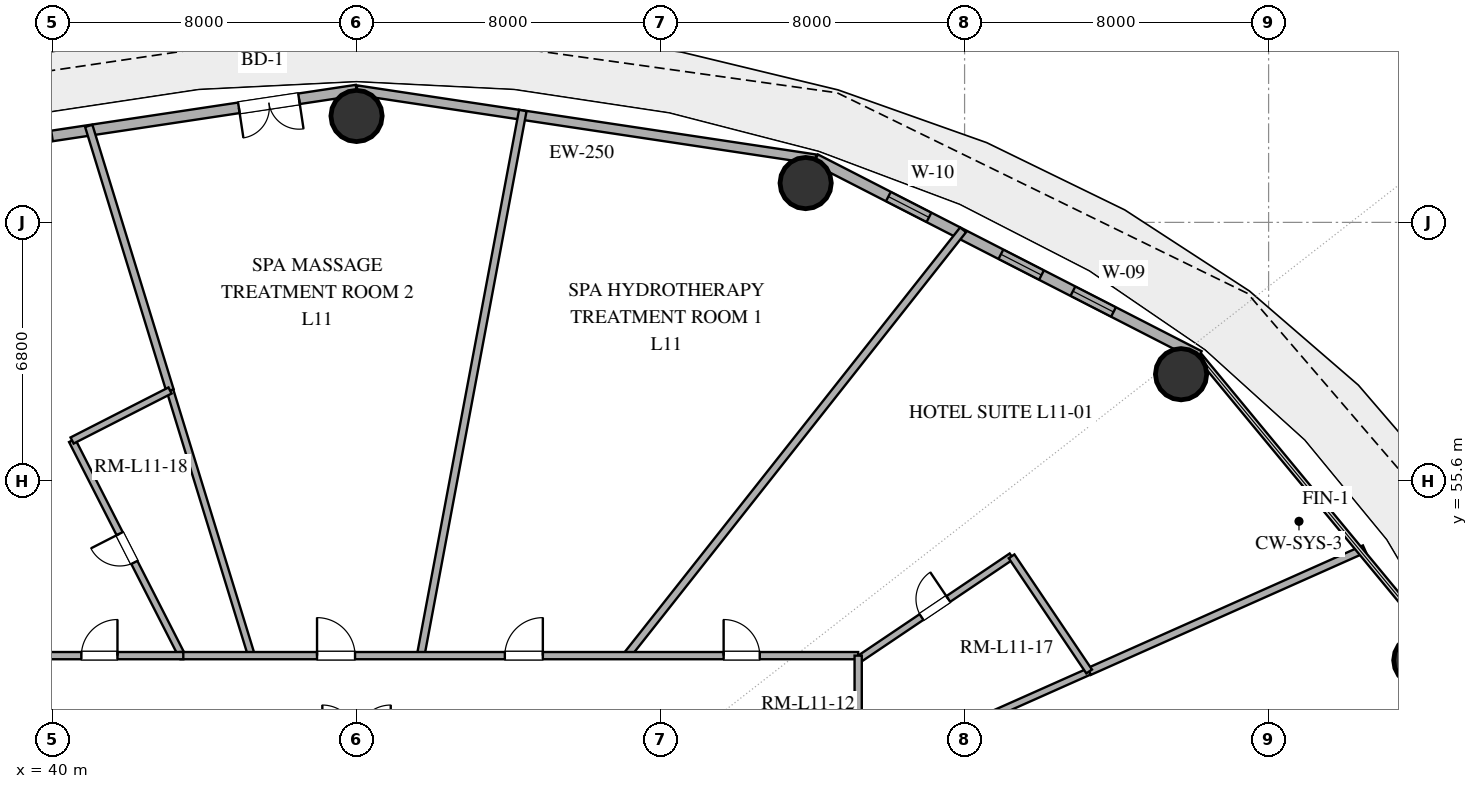
"""IFC4 building model, lengths in metres.
Left out: names, types, materials, properties, quantities, classifications, styles, units other than length and angle.
Written with IfcOpenShell. Run it as: python <this file> out.ifc"""

import sys

from ifc_helpers import new_model, si_unit, direction, frame, frame_2d, origin, origin_2d, place, context, subcontext, project, spatial, rectangle, hollow_circle, extrude, element, fill, save


model = new_model("IFC4")
c1 = context("Model", 3, precision=1e-05, world=origin(), true_north=direction((0.0, 1.0)))
c2 = subcontext(c1, "Body", "Model", "MODEL_VIEW")
j1 = project(units=[si_unit("LENGTHUNIT", "METRE"), si_unit("PLANEANGLEUNIT", "RADIAN")], contexts=[c1])
p1 = place(None, origin())
s1 = spatial("IfcSite", under=j1, at=p1, CompositionType="ELEMENT")
p2 = place(p1, origin())
s2 = spatial("IfcBuilding", under=s1, at=p2, CompositionType="ELEMENT")
p3 = place(p2, frame((0.0, 0.0, 49.8)))
s3 = spatial("IfcBuildingStorey", under=s2, at=p3, CompositionType="ELEMENT", Elevation=49.8)
for number, where, z_axis, x_axis in (
    (1, (75.966, 50.878, 0.0), (0.0, 0.0, 1.0), (1.0, 0.0, 0.0)),
    (2, (69.697, 58.405, 0.0), (0.0, 0.0, 1.0), (1.0, 0.0, 0.0)),
    (3, (59.818, 63.434, 0.0), (0.0, 0.0, 1.0), (1.0, 0.0, 0.0)),
    (4, (48.0, 65.2, 0.0), (0.0, 0.0, 1.0), (1.0, 0.0, 0.0)),
):
    element("IfcColumn", number, at=place(p3, frame(where, z_axis=z_axis, x_axis=x_axis)), inside=s3, PredefinedType="COLUMN", context=c2, shape_type="SweptSolid", body=[
        extrude(hollow_circle(Radius=0.675, WallThickness=0.036, at=origin_2d()), origin(), (0.0, 0.0, 1.0), 3.38),
    ])
p4 = place(p3, frame((70.174, 58.886, 0.0), z_axis=(0.0, 0.0, 1.0), x_axis=(-0.889853976658, 0.456245438581, 0.0)))
e5 = element("IfcWall", 5, at=p4, inside=s3, PredefinedType="SOLIDWALL", context=c2, shape_type="SweptSolid", body=[
    extrude(rectangle(XDim=11.346, YDim=0.28, at=frame_2d((5.673, 0.0))), origin(), (0.0, 0.0, 1.0), 3.38),
])
p5 = place(p4, frame((2.535, 0.0, 0.85)))
e6 = element("IfcOpeningElement", 6, at=p5, cuts=e5, PredefinedType="OPENING", context=c2, shape_type="SweptSolid", body=[
    extrude(rectangle(XDim=1.2, YDim=1.8, at=frame_2d((0.6, 0.9))), frame((0.0, 0.15, 0.0), z_axis=(0.0, -1.0, 0.0), x_axis=(1.0, 0.0, 0.0)), (0.0, 0.0, 1.0), 0.3),
])
p6 = place(p4, frame((4.664, 0.0, 0.85)))
e7 = element("IfcOpeningElement", 7, at=p6, cuts=e5, PredefinedType="OPENING", context=c2, shape_type="SweptSolid", body=[
    extrude(rectangle(XDim=1.2, YDim=1.8, at=frame_2d((0.6, 0.9))), frame((0.0, 0.15, 0.0), z_axis=(0.0, -1.0, 0.0), x_axis=(1.0, 0.0, 0.0)), (0.0, 0.0, 1.0), 0.3),
])
p7 = place(p4, frame((7.992, 0.0, 0.85)))
e8 = element("IfcOpeningElement", 8, at=p7, cuts=e5, PredefinedType="OPENING", context=c2, shape_type="SweptSolid", body=[
    extrude(rectangle(XDim=1.2, YDim=1.6, at=frame_2d((0.6, 0.8))), frame((0.0, 0.15, 0.0), z_axis=(0.0, -1.0, 0.0), x_axis=(1.0, 0.0, 0.0)), (0.0, 0.0, 1.0), 0.3),
])
p8 = place(p3, frame((60.078, 64.062, 0.0), z_axis=(0.0, 0.0, 1.0), x_axis=(-0.988864835849, 0.148816452121, 0.0)))
e9 = element("IfcWall", 9, at=p8, inside=s3, PredefinedType="SOLIDWALL", context=c2, shape_type="SweptSolid", body=[
    extrude(rectangle(XDim=12.214, YDim=0.25, at=frame_2d((6.107, 0.0))), origin(), (0.0, 0.0, 1.0), 3.38),
])
p9 = place(p3, frame((48.0, 65.88, 0.0), z_axis=(0.0, 0.0, 1.0), x_axis=(-0.988864835849, -0.148816452121, 0.0)))
e10 = element("IfcWall", 10, at=p9, inside=s3, PredefinedType="SOLIDWALL", context=c2, shape_type="SweptSolid", body=[
    extrude(rectangle(XDim=12.214, YDim=0.28, at=frame_2d((6.107, 0.0))), origin(), (0.0, 0.0, 1.0), 3.38),
])
p10 = place(p9, frame((1.531, 0.0, 0.0)))
e11 = element("IfcOpeningElement", 11, at=p10, cuts=e10, PredefinedType="OPENING", context=c2, shape_type="SweptSolid", body=[
    extrude(rectangle(XDim=1.6, YDim=2.25, at=frame_2d((0.8, 1.125))), frame((0.0, 0.15, 0.0), z_axis=(0.0, -1.0, 0.0), x_axis=(1.0, 0.0, 0.0)), (0.0, 0.0, 1.0), 0.3),
])
p11 = place(p9, frame((8.104, 0.0, 0.85)))
e12 = element("IfcOpeningElement", 12, at=p11, cuts=e10, PredefinedType="OPENING", context=c2, shape_type="SweptSolid", body=[
    extrude(rectangle(XDim=1.8, YDim=2.2, at=frame_2d((0.9, 1.1))), frame((0.0, 0.15, 0.0), z_axis=(0.0, -1.0, 0.0), x_axis=(1.0, 0.0, 0.0)), (0.0, 0.0, 1.0), 0.3),
])
p12 = place(p3, frame((52.375, 65.343, 0.0), z_axis=(0.0, 0.0, 1.0), x_axis=(-0.184219844734, -0.982885063884, 0.0)))
e13 = element("IfcWall", 13, at=p12, inside=s3, PredefinedType="PARTITIONING", context=c2, shape_type="SweptSolid", body=[
    extrude(rectangle(XDim=14.593, YDim=0.2, at=frame_2d((7.296, 0.0))), origin(), (0.0, 0.0, 1.0), 2.74),
])
p13 = place(p3, frame((63.96, 62.204, 0.0), z_axis=(0.0, 0.0, 1.0), x_axis=(-0.619889304847, -0.784689269543, 0.0)))
e14 = element("IfcWall", 14, at=p13, inside=s3, PredefinedType="PARTITIONING", context=c2, shape_type="SweptSolid", body=[
    extrude(rectangle(XDim=14.278, YDim=0.2, at=frame_2d((7.139, 0.0))), origin(), (0.0, 0.0, 1.0), 2.74),
])
p14 = place(p3, frame((74.523, 53.809, 0.0), z_axis=(0.0, 0.0, 1.0), x_axis=(-0.913542208968, -0.40674393964, 0.0)))
e15 = element("IfcWall", 15, at=p14, inside=s3, PredefinedType="PARTITIONING", context=c2, shape_type="SweptSolid", body=[
    extrude(rectangle(XDim=7.93, YDim=0.2, at=frame_2d((3.965, 0.0))), origin(), (0.0, 0.0, 1.0), 2.74),
])
p15 = place(p3, frame((43.092, 57.976, 0.0), z_axis=(0.0, 0.0, 1.0), x_axis=(0.293648581073, -0.95591344317, 0.0)))
e16 = element("IfcWall", 16, at=p15, inside=s3, PredefinedType="PLUMBINGWALL", context=c2, shape_type="SweptSolid", body=[
    extrude(rectangle(XDim=7.298, YDim=0.18, at=frame_2d((3.649, 0.0))), origin(), (0.0, 0.0, 1.0), 2.74),
])
p16 = place(p3, frame((40.953, 64.939, 0.0), z_axis=(0.0, 0.0, 1.0), x_axis=(0.293635973675, -0.955917315966, 0.0)))
e17 = element("IfcWall", 17, at=p16, inside=s3, PredefinedType="PARTITIONING", context=c2, shape_type="SweptSolid", body=[
    extrude(rectangle(XDim=7.284, YDim=0.2, at=frame_2d((3.642, 0.0))), origin(), (0.0, 0.0, 1.0), 2.74),
])
p17 = place(p3, frame((67.278, 50.583, 0.0), z_axis=(0.0, 0.0, 1.0), x_axis=(-0.913551093465, -0.406723984575, 0.0)))
e18 = element("IfcWall", 18, at=p17, inside=s3, PredefinedType="PLUMBINGWALL", context=c2, shape_type="SweptSolid", body=[
    extrude(rectangle(XDim=6.653, YDim=0.18, at=frame_2d((3.327, 0.0))), origin(), (0.0, 0.0, 1.0), 2.74),
])
p18 = place(p3, frame((43.405, 51.0, 0.0), z_axis=(0.0, 0.0, 1.0), x_axis=(-0.454680565764, 0.890654581259, 0.0)))
e19 = element("IfcWall", 19, at=p18, inside=s3, PredefinedType="PLUMBINGWALL", context=c2, shape_type="SweptSolid", body=[
    extrude(rectangle(XDim=6.356, YDim=0.18, at=frame_2d((3.178, 0.0))), origin(), (0.0, 0.0, 1.0), 2.74),
])
p19 = place(p18, frame((2.753, 0.0, 0.0)))
e20 = element("IfcOpeningElement", 20, at=p19, cuts=e19, PredefinedType="OPENING", context=c2, shape_type="SweptSolid", body=[
    extrude(rectangle(XDim=0.85, YDim=2.1, at=frame_2d((0.425, 1.05))), frame((0.0, 0.1, 0.0), z_axis=(0.0, -1.0, 0.0), x_axis=(1.0, 0.0, 0.0)), (0.0, 0.0, 1.0), 0.2),
])
p20 = place(p3, frame((43.369, 51.0, 0.0), z_axis=(0.0, 0.0, 1.0), x_axis=(1.0, 0.0, 0.0)))
e21 = element("IfcWall", 21, at=p20, inside=s3, PredefinedType="PARTITIONING", context=c2, shape_type="SweptSolid", body=[
    extrude(rectangle(XDim=17.831, YDim=0.19, at=frame_2d((8.916, 0.0))), origin(), (0.0, 0.0, 1.0), 2.74),
])
p21 = place(p20, frame((14.29, 0.0, 0.0)))
e22 = element("IfcOpeningElement", 22, at=p21, cuts=e21, PredefinedType="OPENING", context=c2, shape_type="SweptSolid", body=[
    extrude(rectangle(XDim=0.95, YDim=2.15, at=frame_2d((0.475, 1.075))), frame((0.0, 0.105, 0.0), z_axis=(0.0, -1.0, 0.0), x_axis=(1.0, 0.0, 0.0)), (0.0, 0.0, 1.0), 0.21),
])
p22 = place(p20, frame((8.533, 0.0, 0.0)))
e23 = element("IfcOpeningElement", 23, at=p22, cuts=e21, PredefinedType="OPENING", context=c2, shape_type="SweptSolid", body=[
    extrude(rectangle(XDim=1.0, YDim=2.2, at=frame_2d((0.5, 1.1))), frame((0.0, 0.105, 0.0), z_axis=(0.0, -1.0, 0.0), x_axis=(1.0, 0.0, 0.0)), (0.0, 0.0, 1.0), 0.21),
])
p23 = place(p20, frame((3.591, 0.0, 0.0)))
e24 = element("IfcOpeningElement", 24, at=p23, cuts=e21, PredefinedType="OPENING", context=c2, shape_type="SweptSolid", body=[
    extrude(rectangle(XDim=1.0, YDim=2.2, at=frame_2d((0.5, 1.1))), frame((0.0, 0.105, 0.0), z_axis=(0.0, -1.0, 0.0), x_axis=(1.0, 0.0, 0.0)), (0.0, 0.0, 1.0), 0.21),
])
p24 = place(p3, frame((61.2, 50.893, 0.0), z_axis=(0.0, 0.0, 1.0), x_axis=(0.829362933151, 0.558710233587, 0.0)))
e25 = element("IfcWall", 25, at=p24, inside=s3, PredefinedType="PLUMBINGWALL", context=c2, shape_type="SweptSolid", body=[
    extrude(rectangle(XDim=4.867, YDim=0.18, at=frame_2d((2.434, 0.0))), origin(), (0.0, 0.0, 1.0), 2.74),
])
p25 = place(p24, frame((2.009, 0.0, 0.0)))
e26 = element("IfcOpeningElement", 26, at=p25, cuts=e25, PredefinedType="OPENING", context=c2, shape_type="SweptSolid", body=[
    extrude(rectangle(XDim=0.85, YDim=2.1, at=frame_2d((0.425, 1.05))), frame((0.0, 0.1, 0.0), z_axis=(0.0, -1.0, 0.0), x_axis=(1.0, 0.0, 0.0)), (0.0, 0.0, 1.0), 0.2),
])
p26 = place(p3, frame((61.2, 51.0, 0.0), z_axis=(0.0, 0.0, 1.0), x_axis=(0.0, -1.0, 0.0)))
e27 = element("IfcWall", 27, at=p26, inside=s3, PredefinedType="PARTITIONING", context=c2, shape_type="SweptSolid", body=[
    extrude(rectangle(XDim=9.852, YDim=0.19, at=frame_2d((4.926, 0.0))), origin(), (0.0, 0.0, 1.0), 2.74),
])
p27 = place(p26, frame((4.859, 0.0, 0.0)))
e28 = element("IfcOpeningElement", 28, at=p27, cuts=e27, PredefinedType="OPENING", context=c2, shape_type="SweptSolid", body=[
    extrude(rectangle(XDim=0.95, YDim=2.15, at=frame_2d((0.475, 1.075))), frame((0.0, 0.105, 0.0), z_axis=(0.0, -1.0, 0.0), x_axis=(1.0, 0.0, 0.0)), (0.0, 0.0, 1.0), 0.21),
])
p28 = place(p3, frame((34.8, 51.0, 0.0), z_axis=(0.0, 0.0, 1.0), x_axis=(1.0, 0.0, 0.0)))
e29 = element("IfcWall", 29, at=p28, inside=s3, PredefinedType="PARTITIONING", context=c2, shape_type="SweptSolid", body=[
    extrude(rectangle(XDim=8.641, YDim=0.19, at=frame_2d((4.32, 0.0))), origin(), (0.0, 0.0, 1.0), 2.74),
])
p29 = place(p28, frame((5.959, 0.0, 0.0)))
e30 = element("IfcOpeningElement", 30, at=p29, cuts=e29, PredefinedType="OPENING", context=c2, shape_type="SweptSolid", body=[
    extrude(rectangle(XDim=0.95, YDim=2.15, at=frame_2d((0.475, 1.075))), frame((0.0, 0.105, 0.0), z_axis=(0.0, -1.0, 0.0), x_axis=(1.0, 0.0, 0.0)), (0.0, 0.0, 1.0), 0.21),
])
p30 = place(p3, frame((65.237, 53.613, 0.0), z_axis=(0.0, 0.0, 1.0), x_axis=(0.558749555988, -0.829336441791, 0.0)))
e31 = element("IfcWall", 31, at=p30, inside=s3, PredefinedType="PLUMBINGWALL", context=c2, shape_type="SweptSolid", body=[
    extrude(rectangle(XDim=3.653, YDim=0.18, at=frame_2d((1.827, 0.0))), origin(), (0.0, 0.0, 1.0), 2.74),
])
p31 = place(p3, frame((40.515, 56.661, 0.0), z_axis=(0.0, 0.0, 1.0), x_axis=(0.890666340124, 0.454657531083, 0.0)))
e32 = element("IfcWall", 32, at=p31, inside=s3, PredefinedType="PLUMBINGWALL", context=c2, shape_type="SweptSolid", body=[
    extrude(rectangle(XDim=2.893, YDim=0.18, at=frame_2d((1.447, 0.0))), origin(), (0.0, 0.0, 1.0), 2.74),
])
p32 = place(p5, origin())
e33 = element("IfcWindow", 33, at=p32, inside=s3, PartitioningType="SINGLE_PANEL", PredefinedType="WINDOW", context=c2, shape_type="SweptSolid", body=[
    extrude(rectangle(XDim=1.2, YDim=1.8, at=frame_2d((0.6, 0.9))), frame((0.0, 0.03, 0.0), z_axis=(0.0, -1.0, 0.0), x_axis=(1.0, 0.0, 0.0)), (0.0, 0.0, 1.0), 0.06),
])
fill(e6, e33)
p33 = place(p6, origin())
e34 = element("IfcWindow", 34, at=p33, inside=s3, PartitioningType="SINGLE_PANEL", PredefinedType="WINDOW", context=c2, shape_type="SweptSolid", body=[
    extrude(rectangle(XDim=1.2, YDim=1.8, at=frame_2d((0.6, 0.9))), frame((0.0, 0.03, 0.0), z_axis=(0.0, -1.0, 0.0), x_axis=(1.0, 0.0, 0.0)), (0.0, 0.0, 1.0), 0.06),
])
fill(e7, e34)
p34 = place(p7, origin())
e35 = element("IfcWindow", 35, at=p34, inside=s3, PartitioningType="SINGLE_PANEL", PredefinedType="WINDOW", context=c2, shape_type="SweptSolid", body=[
    extrude(rectangle(XDim=1.2, YDim=1.6, at=frame_2d((0.6, 0.8))), frame((0.0, 0.03, 0.0), z_axis=(0.0, -1.0, 0.0), x_axis=(1.0, 0.0, 0.0)), (0.0, 0.0, 1.0), 0.06),
])
fill(e8, e35)
p35 = place(p10, origin())
e36 = element("IfcDoor", 36, at=p35, inside=s3, OperationType="DOUBLE_DOOR_SINGLE_SWING", PredefinedType="DOOR", context=c2, shape_type="SweptSolid", body=[
    extrude(rectangle(XDim=1.6, YDim=2.25, at=frame_2d((0.8, 1.125))), frame((0.0, 0.025, 0.0), z_axis=(0.0, -1.0, 0.0), x_axis=(1.0, 0.0, 0.0)), (0.0, 0.0, 1.0), 0.05),
])
fill(e11, e36)
p36 = place(p11, origin())
e37 = element("IfcWindow", 37, at=p36, inside=s3, PartitioningType="SINGLE_PANEL", PredefinedType="WINDOW", context=c2, shape_type="SweptSolid", body=[
    extrude(rectangle(XDim=1.8, YDim=2.2, at=frame_2d((0.9, 1.1))), frame((0.0, 0.03, 0.0), z_axis=(0.0, -1.0, 0.0), x_axis=(1.0, 0.0, 0.0)), (0.0, 0.0, 1.0), 0.06),
])
fill(e12, e37)
p37 = place(p19, origin())
e38 = element("IfcDoor", 38, at=p37, inside=s3, OperationType="SINGLE_SWING_RIGHT", PredefinedType="DOOR", context=c2, shape_type="SweptSolid", body=[
    extrude(rectangle(XDim=0.85, YDim=2.1, at=frame_2d((0.425, 1.05))), frame((0.0, 0.025, 0.0), z_axis=(0.0, -1.0, 0.0), x_axis=(1.0, 0.0, 0.0)), (0.0, 0.0, 1.0), 0.05),
])
fill(e20, e38)
p38 = place(p21, origin())
e39 = element("IfcDoor", 39, at=p38, inside=s3, OperationType="SINGLE_SWING_LEFT", PredefinedType="DOOR", context=c2, shape_type="SweptSolid", body=[
    extrude(rectangle(XDim=0.95, YDim=2.15, at=frame_2d((0.475, 1.075))), frame((0.0, 0.025, 0.0), z_axis=(0.0, -1.0, 0.0), x_axis=(1.0, 0.0, 0.0)), (0.0, 0.0, 1.0), 0.05),
])
fill(e22, e39)
p39 = place(p22, origin())
e40 = element("IfcDoor", 40, at=p39, inside=s3, OperationType="SINGLE_SWING_RIGHT", PredefinedType="DOOR", context=c2, shape_type="SweptSolid", body=[
    extrude(rectangle(XDim=1.0, YDim=2.2, at=frame_2d((0.5, 1.1))), frame((0.0, 0.025, 0.0), z_axis=(0.0, -1.0, 0.0), x_axis=(1.0, 0.0, 0.0)), (0.0, 0.0, 1.0), 0.05),
])
fill(e23, e40)
p40 = place(p23, origin())
e41 = element("IfcDoor", 41, at=p40, inside=s3, OperationType="SINGLE_SWING_LEFT", PredefinedType="DOOR", context=c2, shape_type="SweptSolid", body=[
    extrude(rectangle(XDim=1.0, YDim=2.2, at=frame_2d((0.5, 1.1))), frame((0.0, 0.025, 0.0), z_axis=(0.0, -1.0, 0.0), x_axis=(1.0, 0.0, 0.0)), (0.0, 0.0, 1.0), 0.05),
])
fill(e24, e41)
p41 = place(p25, origin())
e42 = element("IfcDoor", 42, at=p41, inside=s3, OperationType="SINGLE_SWING_RIGHT", PredefinedType="DOOR", context=c2, shape_type="SweptSolid", body=[
    extrude(rectangle(XDim=0.85, YDim=2.1, at=frame_2d((0.425, 1.05))), frame((0.0, 0.025, 0.0), z_axis=(0.0, -1.0, 0.0), x_axis=(1.0, 0.0, 0.0)), (0.0, 0.0, 1.0), 0.05),
])
fill(e26, e42)
p42 = place(p29, origin())
e43 = element("IfcDoor", 43, at=p42, inside=s3, OperationType="SINGLE_SWING_RIGHT", PredefinedType="DOOR", context=c2, shape_type="SweptSolid", body=[
    extrude(rectangle(XDim=0.95, YDim=2.15, at=frame_2d((0.475, 1.075))), frame((0.0, 0.025, 0.0), z_axis=(0.0, -1.0, 0.0), x_axis=(1.0, 0.0, 0.0)), (0.0, 0.0, 1.0), 0.05),
])
fill(e30, e43)
save(model, sys.argv[1])
